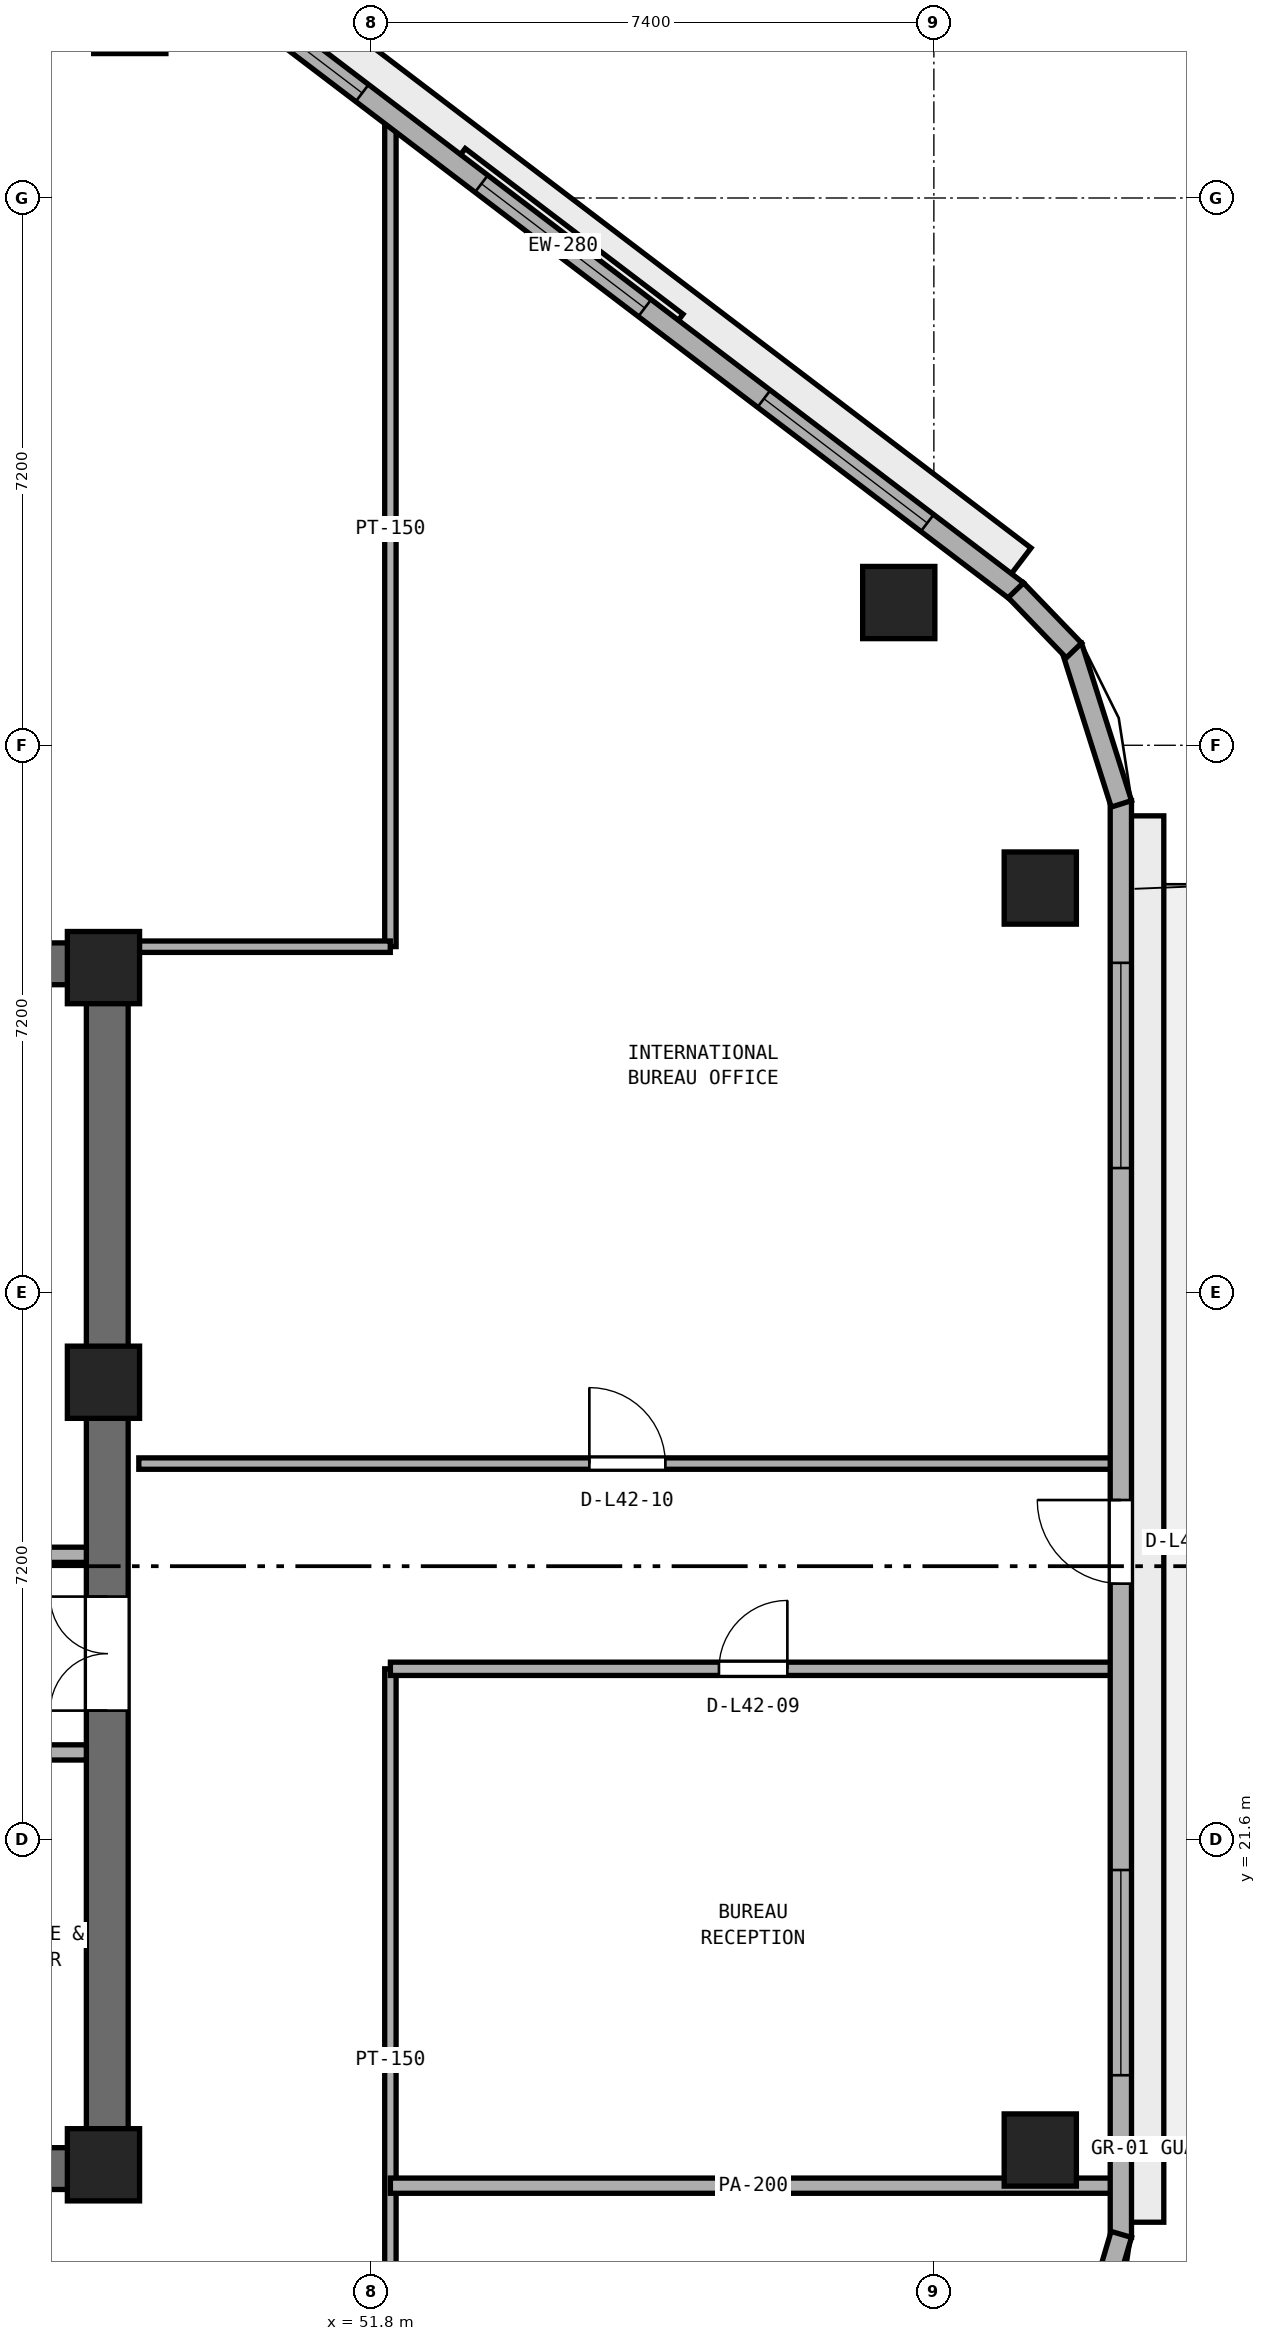
"""IFC4 building model, lengths in metres.
Left out: names, types, materials, properties, quantities, classifications, styles, units other than length and angle.
Written with IfcOpenShell. Run it as: python <this file> out.ifc"""

import sys

from ifc_helpers import new_model, si_unit, direction, frame, frame_2d, origin, origin_2d, place, context, subcontext, project, spatial, rectangle, extrude, element, fill, save


model = new_model("IFC4")
c1 = context("Model", 3, precision=1e-05, world=origin(), true_north=direction((0.0, 1.0)))
c2 = subcontext(c1, "Body", "Model", "MODEL_VIEW")
j1 = project(units=[si_unit("LENGTHUNIT", "METRE"), si_unit("PLANEANGLEUNIT", "RADIAN")], contexts=[c1])
p1 = place(None, origin())
s1 = spatial("IfcSite", under=j1, at=p1, CompositionType="ELEMENT")
p2 = place(p1, origin())
s2 = spatial("IfcBuilding", under=s1, at=p2, CompositionType="ELEMENT")
p3 = place(p2, frame((0.0, 0.0, 166.8)))
s3 = spatial("IfcBuildingStorey", under=s2, at=p3, CompositionType="ELEMENT", Elevation=166.8)
for number, where, z_axis, x_axis in (
    (1, (25.4, 17.275, 0.0), (0.0, 0.0, 1.0), (1.0, 0.0, 0.0)),
    (2, (25.4, 33.125, 0.0), (0.0, 0.0, 1.0), (1.0, 0.0, 0.0)),
):
    element("IfcWall", number, at=place(p3, frame(where, z_axis=z_axis, x_axis=x_axis)), inside=s3, PredefinedType="SHEAR", context=c2, shape_type="SweptSolid", body=[
        extrude(rectangle(XDim=23.2, YDim=0.55, at=frame_2d((11.6, 0.0))), origin(), (0.0, 0.0, 1.0), 3.54),
    ])
p4 = place(p3, frame((48.325, 17.55, 0.0), z_axis=(0.0, 0.0, 1.0), x_axis=(0.0, 1.0, 0.0)))
e3 = element("IfcWall", 3, at=p4, inside=s3, PredefinedType="SHEAR", context=c2, shape_type="SweptSolid", body=[
    extrude(rectangle(XDim=15.3, YDim=0.55, at=frame_2d((7.65, 0.0))), origin(), (0.0, 0.0, 1.0), 3.54),
])
p5 = place(p4, frame((5.75, 0.0, 0.0)))
e4 = element("IfcOpeningElement", 4, at=p5, cuts=e3, PredefinedType="OPENING", context=c2, shape_type="SweptSolid", body=[
    extrude(rectangle(XDim=1.5, YDim=2.15, at=frame_2d((0.75, 1.075))), frame((0.0, 0.285, 0.0), z_axis=(0.0, -1.0, 0.0), x_axis=(1.0, 0.0, 0.0)), (0.0, 0.0, 1.0), 0.57),
])
for number, where, z_axis, x_axis in (
    (5, (48.275, 17.325, 0.0), (0.0, 0.0, 1.0), (1.0, 0.0, 0.0)),
    (6, (48.275, 27.62, 0.0), (0.0, 0.0, 1.0), (1.0, 0.0, 0.0)),
    (7, (48.275, 33.075, 0.0), (0.0, 0.0, 1.0), (1.0, 0.0, 0.0)),
):
    element("IfcColumn", number, at=place(p3, frame(where, z_axis=z_axis, x_axis=x_axis)), inside=s3, PredefinedType="PILASTER", context=c2, shape_type="SweptSolid", body=[
        extrude(rectangle(XDim=0.95, YDim=0.95, at=origin_2d()), origin(), (0.0, 0.0, 1.0), 3.8),
    ])
for number, where, z_axis, x_axis in (
    (8, (60.6, 17.519, 0.0), (0.0, 0.0, 1.0), (1.0, 0.0, 0.0)),
    (9, (60.6, 34.122, 0.0), (0.0, 0.0, 1.0), (1.0, 0.0, 0.0)),
    (10, (58.738, 37.878, 0.0), (0.0, 0.0, 1.0), (1.0, 0.0, 0.0)),
    (11, (48.622, 45.575, 0.0), (0.0, 0.0, 1.0), (1.0, 0.0, 0.0)),
):
    element("IfcColumn", number, at=place(p3, frame(where, z_axis=z_axis, x_axis=x_axis)), inside=s3, PredefinedType="COLUMN", context=c2, shape_type="SweptSolid", body=[
        extrude(rectangle(XDim=0.95, YDim=0.95, at=origin_2d()), origin(), (0.0, 0.0, 1.0), 3.8),
    ])
p6 = place(p3, frame((42.0, 22.75, 0.0), z_axis=(0.0, 0.0, 1.0), x_axis=(1.0, 0.0, 0.0)))
e12 = element("IfcWall", 12, at=p6, inside=s3, PredefinedType="SOLIDWALL", context=c2, shape_type="SweptSolid", body=[
    extrude(rectangle(XDim=6.05, YDim=0.2, at=frame_2d((3.025, 0.0))), origin(), (0.0, 0.0, 1.0), 3.54),
])
p7 = place(p3, frame((46.1, 25.35, 0.0), z_axis=(0.0, 0.0, 1.0), x_axis=(1.0, 0.0, 0.0)))
e13 = element("IfcWall", 13, at=p7, inside=s3, PredefinedType="SOLIDWALL", context=c2, shape_type="SweptSolid", body=[
    extrude(rectangle(XDim=1.95, YDim=0.2, at=frame_2d((0.975, 0.0))), origin(), (0.0, 0.0, 1.0), 3.54),
])
p8 = place(p3, frame((52.05, 13.55, 0.0), z_axis=(0.0, 0.0, 1.0), x_axis=(0.0, 1.0, 0.0)))
e14 = element("IfcWall", 14, at=p8, inside=s3, PredefinedType="PARTITIONING", context=c2, shape_type="SweptSolid", body=[
    extrude(rectangle(XDim=10.3, YDim=0.15, at=frame_2d((5.15, 0.0))), origin(), (0.0, 0.0, 1.0), 3.54),
])
p9 = place(p3, frame((52.05, 33.352, 0.0), z_axis=(0.0, 0.0, 1.0), x_axis=(0.0, 1.0, 0.0)))
e15 = element("IfcWall", 15, at=p9, inside=s3, PredefinedType="PARTITIONING", context=c2, shape_type="SweptSolid", body=[
    extrude(rectangle(XDim=10.983, YDim=0.15, at=frame_2d((5.491, 0.0))), origin(), (0.0, 0.0, 1.0), 3.54),
])
p10 = place(p3, frame((52.05, 17.05, 0.0), z_axis=(0.0, 0.0, 1.0), x_axis=(1.0, 0.0, 0.0)))
e16 = element("IfcWall", 16, at=p10, inside=s3, PredefinedType="PARTITIONING", context=c2, shape_type="SweptSolid", body=[
    extrude(rectangle(XDim=9.545, YDim=0.2, at=frame_2d((4.772, 0.0))), origin(), (0.0, 0.0, 1.0), 3.54),
])
p11 = place(p3, frame((52.05, 23.85, 0.0), z_axis=(0.0, 0.0, 1.0), x_axis=(1.0, 0.0, 0.0)))
e17 = element("IfcWall", 17, at=p11, inside=s3, PredefinedType="PARTITIONING", context=c2, shape_type="SweptSolid", body=[
    extrude(rectangle(XDim=9.545, YDim=0.175, at=frame_2d((4.772, 0.0))), origin(), (0.0, 0.0, 1.0), 3.54),
])
p12 = place(p11, frame((4.323, 0.0, 0.0)))
e18 = element("IfcOpeningElement", 18, at=p12, cuts=e17, PredefinedType="OPENING", context=c2, shape_type="SweptSolid", body=[
    extrude(rectangle(XDim=0.9, YDim=2.1, at=frame_2d((0.45, 1.05))), frame((0.0, 0.097, 0.0), z_axis=(0.0, -1.0, 0.0), x_axis=(1.0, 0.0, 0.0)), (0.0, 0.0, 1.0), 0.195),
])
p13 = place(p3, frame((48.74, 26.55, 0.0), z_axis=(0.0, 0.0, 1.0), x_axis=(1.0, 0.0, 0.0)))
e19 = element("IfcWall", 19, at=p13, inside=s3, PredefinedType="PARTITIONING", context=c2, shape_type="SweptSolid", body=[
    extrude(rectangle(XDim=12.855, YDim=0.15, at=frame_2d((6.427, 0.0))), origin(), (0.0, 0.0, 1.0), 3.54),
])
p14 = place(p13, frame((5.927, 0.0, 0.0)))
e20 = element("IfcOpeningElement", 20, at=p14, cuts=e19, PredefinedType="OPENING", context=c2, shape_type="SweptSolid", body=[
    extrude(rectangle(XDim=1.0, YDim=2.12, at=frame_2d((0.5, 1.06))), frame((0.0, 0.085, 0.0), z_axis=(0.0, -1.0, 0.0), x_axis=(1.0, 0.0, 0.0)), (0.0, 0.0, 1.0), 0.17),
])
p15 = place(p3, frame((48.74, 33.35, 0.0), z_axis=(0.0, 0.0, 1.0), x_axis=(1.0, 0.0, 0.0)))
e21 = element("IfcWall", 21, at=p15, inside=s3, PredefinedType="PARTITIONING", context=c2, shape_type="SweptSolid", body=[
    extrude(rectangle(XDim=3.309, YDim=0.15, at=frame_2d((1.654, 0.0))), origin(), (0.0, 0.0, 1.0), 2.923),
])
p16 = place(p3, frame((61.66, 16.369, 0.0), z_axis=(0.0, 0.0, 1.0), x_axis=(0.0, 1.0, 0.0)))
e22 = element("IfcWall", 22, at=p16, inside=s3, PredefinedType="STANDARD", context=c2, shape_type="SweptSolid", body=[
    extrude(rectangle(XDim=18.902, YDim=0.28, at=frame_2d((9.451, 0.0))), origin(), (0.0, 0.0, 1.0), 3.54),
])
p17 = place(p16, frame((8.601, 0.0, 0.0)))
e23 = element("IfcOpeningElement", 23, at=p17, cuts=e22, PredefinedType="OPENING", context=c2, shape_type="SweptSolid", body=[
    extrude(rectangle(XDim=1.1, YDim=2.2, at=frame_2d((0.55, 1.1))), frame((0.0, 0.15, 0.0), z_axis=(0.0, -1.0, 0.0), x_axis=(1.0, 0.0, 0.0)), (0.0, 0.0, 1.0), 0.3),
])
p18 = place(p16, frame((2.134, 0.0, 0.9)))
e24 = element("IfcOpeningElement", 24, at=p18, cuts=e22, PredefinedType="OPENING", context=c2, shape_type="SweptSolid", body=[
    extrude(rectangle(XDim=2.7, YDim=1.75, at=frame_2d((1.35, 0.875))), frame((0.0, 0.15, 0.0), z_axis=(0.0, -1.0, 0.0), x_axis=(1.0, 0.0, 0.0)), (0.0, 0.0, 1.0), 0.3),
])
p19 = place(p16, frame((14.069, 0.0, 0.9)))
e25 = element("IfcOpeningElement", 25, at=p19, cuts=e22, PredefinedType="OPENING", context=c2, shape_type="SweptSolid", body=[
    extrude(rectangle(XDim=2.7, YDim=1.75, at=frame_2d((1.35, 0.875))), frame((0.0, 0.15, 0.0), z_axis=(0.0, -1.0, 0.0), x_axis=(1.0, 0.0, 0.0)), (0.0, 0.0, 1.0), 0.3),
])
p20 = place(p3, frame((60.295, 38.025, 0.0), z_axis=(0.0, 0.0, 1.0), x_axis=(-0.795831760834, 0.605517801925, 0.0)))
e26 = element("IfcWall", 26, at=p20, inside=s3, PredefinedType="STANDARD", context=c2, shape_type="SweptSolid", body=[
    extrude(rectangle(XDim=15.012, YDim=0.28, at=frame_2d((7.506, 0.0))), origin(), (0.0, 0.0, 1.0), 3.54),
])
p21 = place(p20, frame((1.485, 0.0, 0.9)))
e27 = element("IfcOpeningElement", 27, at=p21, cuts=e26, PredefinedType="OPENING", context=c2, shape_type="SweptSolid", body=[
    extrude(rectangle(XDim=2.7, YDim=1.75, at=frame_2d((1.35, 0.875))), frame((0.0, 0.15, 0.0), z_axis=(0.0, -1.0, 0.0), x_axis=(1.0, 0.0, 0.0)), (0.0, 0.0, 1.0), 0.3),
])
p22 = place(p20, frame((6.156, 0.0, 0.9)))
e28 = element("IfcOpeningElement", 28, at=p22, cuts=e26, PredefinedType="OPENING", context=c2, shape_type="SweptSolid", body=[
    extrude(rectangle(XDim=2.7, YDim=1.75, at=frame_2d((1.35, 0.875))), frame((0.0, 0.15, 0.0), z_axis=(0.0, -1.0, 0.0), x_axis=(1.0, 0.0, 0.0)), (0.0, 0.0, 1.0), 0.3),
])
p23 = place(p20, frame((10.826, 0.0, 0.9)))
e29 = element("IfcOpeningElement", 29, at=p23, cuts=e26, PredefinedType="OPENING", context=c2, shape_type="SweptSolid", body=[
    extrude(rectangle(XDim=2.7, YDim=1.75, at=frame_2d((1.35, 0.875))), frame((0.0, 0.15, 0.0), z_axis=(0.0, -1.0, 0.0), x_axis=(1.0, 0.0, 0.0)), (0.0, 0.0, 1.0), 0.3),
])
p24 = place(p3, frame((61.086, 14.45, 0.0), z_axis=(0.0, 0.0, 1.0), x_axis=(0.283660953453, 0.958924639107, 0.0)))
e30 = element("IfcWall", 30, at=p24, inside=s3, PredefinedType="STANDARD", context=c2, shape_type="SweptSolid", body=[
    extrude(rectangle(XDim=2.042, YDim=0.28, at=frame_2d((1.021, 0.0))), origin(), (0.0, 0.0, 1.0), 3.54),
])
p25 = place(p3, frame((61.667, 35.229, 0.0), z_axis=(0.0, 0.0, 1.0), x_axis=(-0.302044777107, 0.953293738898, 0.0)))
e31 = element("IfcWall", 31, at=p25, inside=s3, PredefinedType="STANDARD", context=c2, shape_type="SweptSolid", body=[
    extrude(rectangle(XDim=2.174, YDim=0.28, at=frame_2d((1.087, 0.0))), origin(), (0.0, 0.0, 1.0), 3.54),
])
p26 = place(p3, frame((61.042, 37.247, 0.0), z_axis=(0.0, 0.0, 1.0), x_axis=(-0.694004126367, 0.719971022045, 0.0)))
e32 = element("IfcWall", 32, at=p26, inside=s3, PredefinedType="STANDARD", context=c2, shape_type="SweptSolid", body=[
    extrude(rectangle(XDim=1.1, YDim=0.28, at=frame_2d((0.55, 0.0))), origin(), (0.0, 0.0, 1.0), 3.54),
])
p27 = place(p5, origin())
e33 = element("IfcDoor", 33, at=p27, inside=s3, OperationType="DOUBLE_DOOR_SINGLE_SWING", PredefinedType="DOOR", context=c2, shape_type="SweptSolid", body=[
    extrude(rectangle(XDim=1.5, YDim=2.15, at=frame_2d((0.75, 1.075))), frame((0.0, 0.025, 0.0), z_axis=(0.0, -1.0, 0.0), x_axis=(1.0, 0.0, 0.0)), (0.0, 0.0, 1.0), 0.05),
])
fill(e4, e33)
p28 = place(p12, origin())
e34 = element("IfcDoor", 34, at=p28, inside=s3, OperationType="SINGLE_SWING_RIGHT", PredefinedType="DOOR", context=c2, shape_type="SweptSolid", body=[
    extrude(rectangle(XDim=0.9, YDim=2.1, at=frame_2d((0.45, 1.05))), frame((0.0, 0.025, 0.0), z_axis=(0.0, -1.0, 0.0), x_axis=(1.0, 0.0, 0.0)), (0.0, 0.0, 1.0), 0.05),
])
fill(e18, e34)
p29 = place(p14, origin())
e35 = element("IfcDoor", 35, at=p29, inside=s3, OperationType="SINGLE_SWING_LEFT", PredefinedType="DOOR", context=c2, shape_type="SweptSolid", body=[
    extrude(rectangle(XDim=1.0, YDim=2.12, at=frame_2d((0.5, 1.06))), frame((0.0, 0.025, 0.0), z_axis=(0.0, -1.0, 0.0), x_axis=(1.0, 0.0, 0.0)), (0.0, 0.0, 1.0), 0.05),
])
fill(e20, e35)
p30 = place(p17, origin())
e36 = element("IfcDoor", 36, at=p30, inside=s3, OperationType="SINGLE_SWING_RIGHT", PredefinedType="DOOR", context=c2, shape_type="SweptSolid", body=[
    extrude(rectangle(XDim=1.1, YDim=2.2, at=frame_2d((0.55, 1.1))), frame((0.0, 0.025, 0.0), z_axis=(0.0, -1.0, 0.0), x_axis=(1.0, 0.0, 0.0)), (0.0, 0.0, 1.0), 0.05),
])
fill(e23, e36)
p31 = place(p18, origin())
e37 = element("IfcWindow", 37, at=p31, inside=s3, PartitioningType="SINGLE_PANEL", PredefinedType="WINDOW", context=c2, shape_type="SweptSolid", body=[
    extrude(rectangle(XDim=2.7, YDim=1.75, at=frame_2d((1.35, 0.875))), frame((0.0, 0.03, 0.0), z_axis=(0.0, -1.0, 0.0), x_axis=(1.0, 0.0, 0.0)), (0.0, 0.0, 1.0), 0.06),
])
fill(e24, e37)
p32 = place(p19, origin())
e38 = element("IfcWindow", 38, at=p32, inside=s3, PartitioningType="SINGLE_PANEL", PredefinedType="WINDOW", context=c2, shape_type="SweptSolid", body=[
    extrude(rectangle(XDim=2.7, YDim=1.75, at=frame_2d((1.35, 0.875))), frame((0.0, 0.03, 0.0), z_axis=(0.0, -1.0, 0.0), x_axis=(1.0, 0.0, 0.0)), (0.0, 0.0, 1.0), 0.06),
])
fill(e25, e38)
p33 = place(p21, origin())
e39 = element("IfcWindow", 39, at=p33, inside=s3, PartitioningType="SINGLE_PANEL", PredefinedType="WINDOW", context=c2, shape_type="SweptSolid", body=[
    extrude(rectangle(XDim=2.7, YDim=1.75, at=frame_2d((1.35, 0.875))), frame((0.0, 0.03, 0.0), z_axis=(0.0, -1.0, 0.0), x_axis=(1.0, 0.0, 0.0)), (0.0, 0.0, 1.0), 0.06),
])
fill(e27, e39)
p34 = place(p22, origin())
e40 = element("IfcWindow", 40, at=p34, inside=s3, PartitioningType="SINGLE_PANEL", PredefinedType="WINDOW", context=c2, shape_type="SweptSolid", body=[
    extrude(rectangle(XDim=2.7, YDim=1.75, at=frame_2d((1.35, 0.875))), frame((0.0, 0.03, 0.0), z_axis=(0.0, -1.0, 0.0), x_axis=(1.0, 0.0, 0.0)), (0.0, 0.0, 1.0), 0.06),
])
fill(e28, e40)
p35 = place(p23, origin())
e41 = element("IfcWindow", 41, at=p35, inside=s3, PartitioningType="SINGLE_PANEL", PredefinedType="WINDOW", context=c2, shape_type="SweptSolid", body=[
    extrude(rectangle(XDim=2.7, YDim=1.75, at=frame_2d((1.35, 0.875))), frame((0.0, 0.03, 0.0), z_axis=(0.0, -1.0, 0.0), x_axis=(1.0, 0.0, 0.0)), (0.0, 0.0, 1.0), 0.06),
])
fill(e29, e41)
save(model, sys.argv[1])
